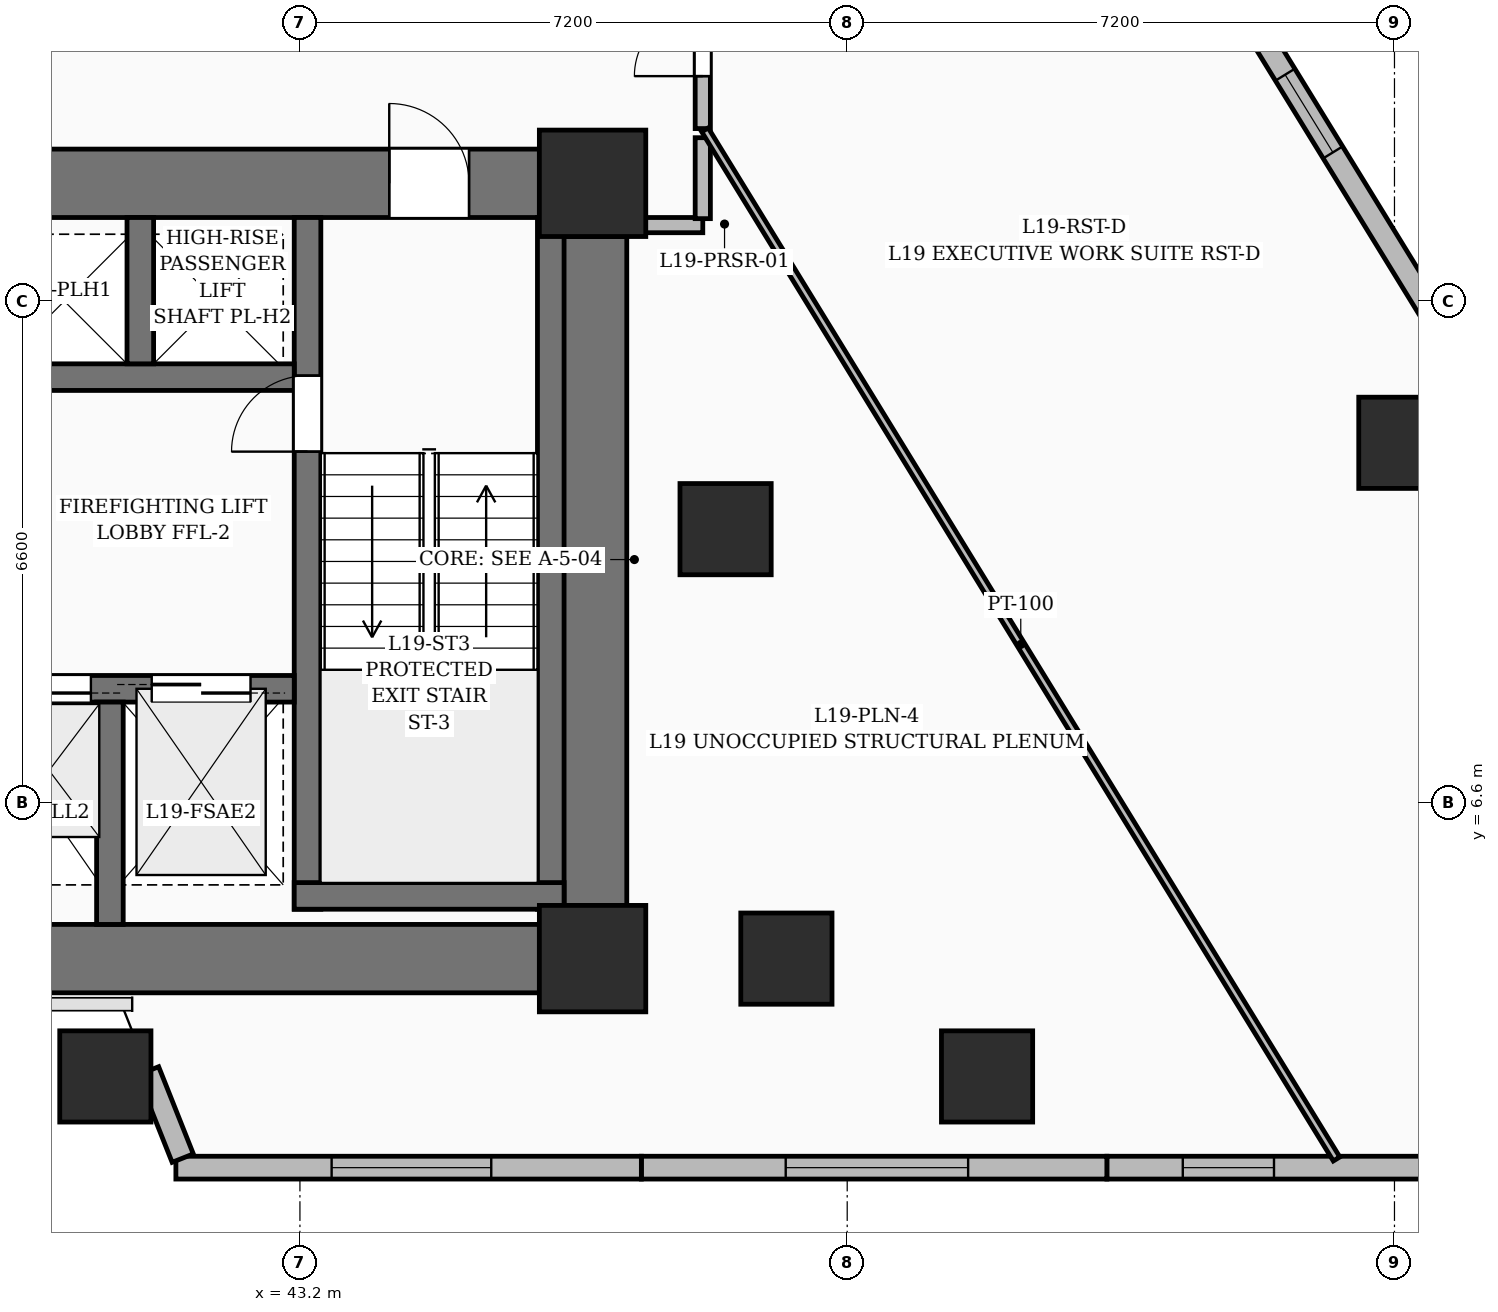
"""IFC4 building model, lengths in metres.
Left out: names, types, materials, properties, quantities, classifications, styles, units other than length and angle.
Written with IfcOpenShell. Run it as: python <this file> out.ifc"""

import sys

from ifc_helpers import new_model, si_unit, direction, frame, frame_2d, origin, origin_2d, place, context, subcontext, project, spatial, rectangle, extrude, element, fill, save


model = new_model("IFC4")
c1 = context("Model", 3, precision=1e-05, world=origin(), true_north=direction((0.0, 1.0)))
c2 = subcontext(c1, "Body", "Model", "MODEL_VIEW")
j1 = project(units=[si_unit("LENGTHUNIT", "METRE"), si_unit("PLANEANGLEUNIT", "RADIAN")], contexts=[c1])
p1 = place(None, origin())
s1 = spatial("IfcSite", under=j1, at=p1, CompositionType="ELEMENT")
p2 = place(p1, origin())
s2 = spatial("IfcBuilding", under=s1, at=p2, CompositionType="ELEMENT")
p3 = place(p2, frame((0.0, 0.0, 78.6)))
s3 = spatial("IfcBuildingStorey", under=s2, at=p3, CompositionType="ELEMENT", Elevation=78.6)
for number, where, z_axis, x_axis in (
    (1, (47.05, 4.55, 0.0), (0.0, 0.0, 1.0), (1.0, 0.0, 0.0)),
    (2, (47.05, 14.75, 0.0), (0.0, 0.0, 1.0), (1.0, 0.0, 0.0)),
):
    element("IfcColumn", number, at=place(p3, frame(where, z_axis=z_axis, x_axis=x_axis)), inside=s3, PredefinedType="COLUMN", context=c2, shape_type="SweptSolid", body=[
        extrude(rectangle(XDim=1.4, YDim=1.4, at=origin_2d()), origin(), (0.0, 0.0, 1.0), 3.6),
    ])
for number, where, z_axis, x_axis in (
    (3, (49.6, 4.55, 0.0), (0.0, 0.0, 1.0), (1.0, 0.0, 0.0)),
    (4, (48.8, 10.2, 0.0), (0.0, 0.0, 1.0), (1.0, 0.0, 0.0)),
):
    element("IfcColumn", number, at=place(p3, frame(where, z_axis=z_axis, x_axis=x_axis)), inside=s3, PredefinedType="COLUMN", context=c2, shape_type="SweptSolid", body=[
        extrude(rectangle(XDim=1.2, YDim=1.2, at=origin_2d()), origin(), (0.0, 0.0, 1.0), 3.6),
    ])
p4 = place(p3, frame((35.85, 4.55, 0.0), z_axis=(0.0, 0.0, 1.0), x_axis=(1.0, 0.0, 0.0)))
e5 = element("IfcWall", 5, at=p4, inside=s3, PredefinedType="SHEAR", context=c2, shape_type="SweptSolid", body=[
    extrude(rectangle(XDim=10.5, YDim=0.9, at=frame_2d((5.25, 0.0))), origin(), (0.0, 0.0, 1.0), 3.6),
])
p5 = place(p3, frame((35.85, 14.75, 0.0), z_axis=(0.0, 0.0, 1.0), x_axis=(1.0, 0.0, 0.0)))
e6 = element("IfcWall", 6, at=p5, inside=s3, PredefinedType="SHEAR", context=c2, shape_type="SweptSolid", body=[
    extrude(rectangle(XDim=10.5, YDim=0.9, at=frame_2d((5.25, 0.0))), origin(), (0.0, 0.0, 1.0), 3.6),
])
p6 = place(p5, frame((0.925, 0.0, 0.0)))
e7 = element("IfcOpeningElement", 7, at=p6, cuts=e6, PredefinedType="OPENING", context=c2, shape_type="SweptSolid", body=[
    extrude(rectangle(XDim=1.05, YDim=2.15, at=frame_2d((0.525, 1.075))), frame((0.0, 0.46, 0.0), z_axis=(0.0, -1.0, 0.0), x_axis=(1.0, 0.0, 0.0)), (0.0, 0.0, 1.0), 0.92),
])
p7 = place(p5, frame((8.525, 0.0, 0.0)))
e8 = element("IfcOpeningElement", 8, at=p7, cuts=e6, PredefinedType="OPENING", context=c2, shape_type="SweptSolid", body=[
    extrude(rectangle(XDim=1.05, YDim=2.15, at=frame_2d((0.525, 1.075))), frame((0.0, 0.46, 0.0), z_axis=(0.0, -1.0, 0.0), x_axis=(1.0, 0.0, 0.0)), (0.0, 0.0, 1.0), 0.92),
])
p8 = place(p3, frame((47.05, 5.25, 0.0), z_axis=(0.0, 0.0, 1.0), x_axis=(0.0, 1.0, 0.0)))
e9 = element("IfcWall", 9, at=p8, inside=s3, PredefinedType="SHEAR", context=c2, shape_type="SweptSolid", body=[
    extrude(rectangle(XDim=8.8, YDim=0.9, at=frame_2d((4.4, 0.0))), origin(), (0.0, 0.0, 1.0), 3.6),
])
p9 = place(p3, frame((43.3, 5.2, 0.0), z_axis=(0.0, 0.0, 1.0), x_axis=(0.0, 1.0, 0.0)))
e10 = element("IfcWall", 10, at=p9, inside=s3, PredefinedType="SOLIDWALL", context=c2, shape_type="SweptSolid", body=[
    extrude(rectangle(XDim=9.1, YDim=0.35, at=frame_2d((4.55, 0.0))), origin(), (0.0, 0.0, 1.0), 3.6),
])
p10 = place(p9, frame((6.02, 0.0, 0.0)))
e11 = element("IfcOpeningElement", 11, at=p10, cuts=e10, PredefinedType="OPENING", context=c2, shape_type="SweptSolid", body=[
    extrude(rectangle(XDim=1.0, YDim=2.15, at=frame_2d((0.5, 1.075))), frame((0.0, 0.185, 0.0), z_axis=(0.0, -1.0, 0.0), x_axis=(1.0, 0.0, 0.0)), (0.0, 0.0, 1.0), 0.37),
])
p11 = place(p3, frame((46.5, 5.2, 0.0), z_axis=(0.0, 0.0, 1.0), x_axis=(0.0, 1.0, 0.0)))
e12 = element("IfcWall", 12, at=p11, inside=s3, PredefinedType="SOLIDWALL", context=c2, shape_type="SweptSolid", body=[
    extrude(rectangle(XDim=9.1, YDim=0.35, at=frame_2d((4.55, 0.0))), origin(), (0.0, 0.0, 1.0), 3.6),
])
p12 = place(p3, frame((43.125, 5.375, 0.0), z_axis=(0.0, 0.0, 1.0), x_axis=(1.0, 0.0, 0.0)))
e13 = element("IfcWall", 13, at=p12, inside=s3, PredefinedType="SOLIDWALL", context=c2, shape_type="SweptSolid", body=[
    extrude(rectangle(XDim=3.55, YDim=0.35, at=frame_2d((1.775, 0.0))), origin(), (0.0, 0.0, 1.0), 3.6),
])
p13 = place(p3, frame((39.075, 8.1, 0.0), z_axis=(0.0, 0.0, 1.0), x_axis=(1.0, 0.0, 0.0)))
e14 = element("IfcWall", 14, at=p13, inside=s3, PredefinedType="SOLIDWALL", context=c2, shape_type="SweptSolid", body=[
    extrude(rectangle(XDim=4.05, YDim=0.35, at=frame_2d((2.025, 0.0))), origin(), (0.0, 0.0, 1.0), 3.6),
])
p14 = place(p13, frame((2.175, 0.0, 0.0)))
e15 = element("IfcOpeningElement", 15, at=p14, cuts=e14, PredefinedType="OPENING", context=c2, shape_type="SweptSolid", body=[
    extrude(rectangle(XDim=1.3, YDim=2.25, at=frame_2d((0.65, 1.125))), frame((0.0, 0.185, 0.0), z_axis=(0.0, -1.0, 0.0), x_axis=(1.0, 0.0, 0.0)), (0.0, 0.0, 1.0), 0.37),
])
p15 = place(p13, frame((0.275, 0.0, 0.0)))
e16 = element("IfcOpeningElement", 16, at=p15, cuts=e14, PredefinedType="OPENING", context=c2, shape_type="SweptSolid", body=[
    extrude(rectangle(XDim=1.1, YDim=2.2, at=frame_2d((0.55, 1.1))), frame((0.0, 0.185, 0.0), z_axis=(0.0, -1.0, 0.0), x_axis=(1.0, 0.0, 0.0)), (0.0, 0.0, 1.0), 0.37),
])
p16 = place(p3, frame((40.7, 5.0, 0.0), z_axis=(0.0, 0.0, 1.0), x_axis=(0.0, 1.0, 0.0)))
e17 = element("IfcWall", 17, at=p16, inside=s3, PredefinedType="SOLIDWALL", context=c2, shape_type="SweptSolid", body=[
    extrude(rectangle(XDim=2.925, YDim=0.35, at=frame_2d((1.462, 0.0))), origin(), (0.0, 0.0, 1.0), 3.6),
])
p17 = place(p3, frame((39.075, 12.2, 0.0), z_axis=(0.0, 0.0, 1.0), x_axis=(1.0, 0.0, 0.0)))
e18 = element("IfcWall", 18, at=p17, inside=s3, PredefinedType="SOLIDWALL", context=c2, shape_type="SweptSolid", body=[
    extrude(rectangle(XDim=4.05, YDim=0.35, at=frame_2d((2.025, 0.0))), origin(), (0.0, 0.0, 1.0), 3.6),
])
p18 = place(p3, frame((41.1, 12.375, 0.0), z_axis=(0.0, 0.0, 1.0), x_axis=(0.0, 1.0, 0.0)))
e19 = element("IfcWall", 19, at=p18, inside=s3, PredefinedType="SOLIDWALL", context=c2, shape_type="SweptSolid", body=[
    extrude(rectangle(XDim=1.925, YDim=0.35, at=frame_2d((0.962, 0.0))), origin(), (0.0, 0.0, 1.0), 3.6),
])
for number, where, z_axis, x_axis in (
    (20, (40.64, 3.0, 0.0), (0.0, 0.0, 1.0), (1.0, 0.0, 0.0)),
    (21, (52.24, 3.0, 0.0), (0.0, 0.0, 1.0), (1.0, 0.0, 0.0)),
    (22, (57.73, 11.336, 0.0), (0.0, 0.0, 1.0), (1.0, 0.0, 0.0)),
):
    element("IfcColumn", number, at=place(p3, frame(where, z_axis=z_axis, x_axis=x_axis)), inside=s3, PredefinedType="COLUMN", context=c2, shape_type="SweptSolid", body=[
        extrude(rectangle(XDim=1.2, YDim=1.2, at=origin_2d()), origin(), (0.0, 0.0, 1.0), 3.6),
    ])
p19 = place(p3, frame((54.041, 19.629, 0.0), z_axis=(0.0, 0.0, 1.0), x_axis=(0.523661280051, -0.851926560083, 0.0)))
e23 = element("IfcWall", 23, at=p19, inside=s3, PredefinedType="SOLIDWALL", context=c2, shape_type="SweptSolid", body=[
    extrude(rectangle(XDim=7.934, YDim=0.3, at=frame_2d((3.967, 0.0))), origin(), (0.0, 0.0, 1.0), 3.35),
])
p20 = place(p19, frame((4.05, 0.0, 0.8)))
e24 = element("IfcOpeningElement", 24, at=p20, cuts=e23, PredefinedType="OPENING", context=c2, shape_type="SweptSolid", body=[
    extrude(rectangle(XDim=1.2, YDim=1.8, at=frame_2d((0.6, 0.9))), frame((0.0, 0.16, 0.0), z_axis=(0.0, -1.0, 0.0), x_axis=(1.0, 0.0, 0.0)), (0.0, 0.0, 1.0), 0.32),
])
p21 = place(p3, frame((59.34, 1.8, 0.0), z_axis=(0.0, 0.0, 1.0), x_axis=(-1.0, 0.0, 0.0)))
e25 = element("IfcWall", 25, at=p21, inside=s3, PredefinedType="SOLIDWALL", context=c2, shape_type="SweptSolid", body=[
    extrude(rectangle(XDim=5.524, YDim=0.3, at=frame_2d((2.762, 0.0))), origin(), (0.0, 0.0, 1.0), 3.35),
])
p22 = place(p21, frame((3.325, 0.0, 0.8)))
e26 = element("IfcOpeningElement", 26, at=p22, cuts=e25, PredefinedType="OPENING", context=c2, shape_type="SweptSolid", body=[
    extrude(rectangle(XDim=1.2, YDim=1.8, at=frame_2d((0.6, 0.9))), frame((0.0, 0.16, 0.0), z_axis=(0.0, -1.0, 0.0), x_axis=(1.0, 0.0, 0.0)), (0.0, 0.0, 1.0), 0.32),
])
p23 = place(p3, frame((53.816, 1.8, 0.0), z_axis=(0.0, 0.0, 1.0), x_axis=(-1.0, 0.0, 0.0)))
e27 = element("IfcWall", 27, at=p23, inside=s3, PredefinedType="SOLIDWALL", context=c2, shape_type="SweptSolid", body=[
    extrude(rectangle(XDim=6.124, YDim=0.3, at=frame_2d((3.062, 0.0))), origin(), (0.0, 0.0, 1.0), 3.35),
])
p24 = place(p23, frame((1.825, 0.0, 0.6)))
e28 = element("IfcOpeningElement", 28, at=p24, cuts=e27, PredefinedType="OPENING", context=c2, shape_type="SweptSolid", body=[
    extrude(rectangle(XDim=2.4, YDim=2.1, at=frame_2d((1.2, 1.05))), frame((0.0, 0.16, 0.0), z_axis=(0.0, -1.0, 0.0), x_axis=(1.0, 0.0, 0.0)), (0.0, 0.0, 1.0), 0.32),
])
p25 = place(p3, frame((47.692, 1.8, 0.0), z_axis=(0.0, 0.0, 1.0), x_axis=(-1.0, 0.0, 0.0)))
e29 = element("IfcWall", 29, at=p25, inside=s3, PredefinedType="SOLIDWALL", context=c2, shape_type="SweptSolid", body=[
    extrude(rectangle(XDim=6.124, YDim=0.3, at=frame_2d((3.062, 0.0))), origin(), (0.0, 0.0, 1.0), 3.35),
])
p26 = place(p25, frame((1.975, 0.0, 0.55)))
e30 = element("IfcOpeningElement", 30, at=p26, cuts=e29, PredefinedType="OPENING", context=c2, shape_type="SweptSolid", body=[
    extrude(rectangle(XDim=2.1, YDim=2.4, at=frame_2d((1.05, 1.2))), frame((0.0, 0.16, 0.0), z_axis=(0.0, -1.0, 0.0), x_axis=(1.0, 0.0, 0.0)), (0.0, 0.0, 1.0), 0.32),
])
p27 = place(p3, frame((41.658, 1.925, 0.0), z_axis=(0.0, 0.0, 1.0), x_axis=(-0.369583004586, 0.929197719929, 0.0)))
e31 = element("IfcWall", 31, at=p27, inside=s3, PredefinedType="SOLIDWALL", context=c2, shape_type="SweptSolid", body=[
    extrude(rectangle(XDim=1.235, YDim=0.3, at=frame_2d((0.617, 0.0))), origin(), (0.0, 0.0, 1.0), 2.375),
])
p28 = place(p3, frame((47.5, 14.2, 0.0), z_axis=(0.0, 0.0, 1.0), x_axis=(1.0, 0.0, 0.0)))
e32 = element("IfcWall", 32, at=p28, inside=s3, PredefinedType="PARTITIONING", context=c2, shape_type="SweptSolid", body=[
    extrude(rectangle(XDim=1.0, YDim=0.2, at=frame_2d((0.5, 0.0))), origin(), (0.0, 0.0, 1.0), 3.35),
])
p29 = place(p3, frame((48.5, 14.285, 0.0), z_axis=(0.0, 0.0, 1.0), x_axis=(0.0, 1.0, 0.0)))
e33 = element("IfcWall", 33, at=p29, inside=s3, PredefinedType="PARTITIONING", context=c2, shape_type="SweptSolid", body=[
    extrude(rectangle(XDim=1.065, YDim=0.2, at=frame_2d((0.533, 0.0))), origin(), (0.0, 0.0, 1.0), 3.35),
])
p30 = place(p3, frame((48.5, 15.47, 0.0), z_axis=(0.0, 0.0, 1.0), x_axis=(0.0, 1.0, 0.0)))
e34 = element("IfcWall", 34, at=p30, inside=s3, PredefinedType="PARTITIONING", context=c2, shape_type="SweptSolid", body=[
    extrude(rectangle(XDim=2.28, YDim=0.2, at=frame_2d((1.14, 0.0))), origin(), (0.0, 0.0, 1.0), 2.345),
])
p31 = place(p30, frame((0.69, 0.0, 0.0)))
e35 = element("IfcOpeningElement", 35, at=p31, cuts=e34, PredefinedType="OPENING", context=c2, shape_type="SweptSolid", body=[
    extrude(rectangle(XDim=0.9, YDim=2.1, at=frame_2d((0.45, 1.05))), frame((0.0, 0.11, 0.0), z_axis=(0.0, -1.0, 0.0), x_axis=(1.0, 0.0, 0.0)), (0.0, 0.0, 1.0), 0.22),
])
p32 = place(p3, frame((48.529, 15.453, 0.0), z_axis=(0.0, 0.0, 1.0), x_axis=(0.52306290803, -0.852294077325, 0.0)))
e36 = element("IfcWall", 36, at=p32, inside=s3, PredefinedType="PARTITIONING", context=c2, shape_type="SweptSolid", body=[
    extrude(rectangle(XDim=15.885, YDim=0.1, at=frame_2d((7.943, 0.0))), origin(), (0.0, 0.0, 1.0), 2.345),
])
p33 = place(p20, origin())
e37 = element("IfcWindow", 37, at=p33, inside=s3, PartitioningType="SINGLE_PANEL", PredefinedType="WINDOW", context=c2, shape_type="SweptSolid", body=[
    extrude(rectangle(XDim=1.2, YDim=1.8, at=frame_2d((0.6, 0.9))), frame((0.0, 0.03, 0.0), z_axis=(0.0, -1.0, 0.0), x_axis=(1.0, 0.0, 0.0)), (0.0, 0.0, 1.0), 0.06),
])
fill(e24, e37)
p34 = place(p22, origin())
e38 = element("IfcWindow", 38, at=p34, inside=s3, PartitioningType="SINGLE_PANEL", PredefinedType="WINDOW", context=c2, shape_type="SweptSolid", body=[
    extrude(rectangle(XDim=1.2, YDim=1.8, at=frame_2d((0.6, 0.9))), frame((0.0, 0.03, 0.0), z_axis=(0.0, -1.0, 0.0), x_axis=(1.0, 0.0, 0.0)), (0.0, 0.0, 1.0), 0.06),
])
fill(e26, e38)
p35 = place(p24, origin())
e39 = element("IfcWindow", 39, at=p35, inside=s3, PartitioningType="SINGLE_PANEL", PredefinedType="WINDOW", context=c2, shape_type="SweptSolid", body=[
    extrude(rectangle(XDim=2.4, YDim=2.1, at=frame_2d((1.2, 1.05))), frame((0.0, 0.03, 0.0), z_axis=(0.0, -1.0, 0.0), x_axis=(1.0, 0.0, 0.0)), (0.0, 0.0, 1.0), 0.06),
])
fill(e28, e39)
p36 = place(p26, origin())
e40 = element("IfcWindow", 40, at=p36, inside=s3, PartitioningType="SINGLE_PANEL", PredefinedType="WINDOW", context=c2, shape_type="SweptSolid", body=[
    extrude(rectangle(XDim=2.1, YDim=2.4, at=frame_2d((1.05, 1.2))), frame((0.0, 0.03, 0.0), z_axis=(0.0, -1.0, 0.0), x_axis=(1.0, 0.0, 0.0)), (0.0, 0.0, 1.0), 0.06),
])
fill(e30, e40)
p37 = place(p7, origin())
e41 = element("IfcDoor", 41, at=p37, inside=s3, OperationType="SINGLE_SWING_LEFT", PredefinedType="DOOR", context=c2, shape_type="SweptSolid", body=[
    extrude(rectangle(XDim=1.05, YDim=2.15, at=frame_2d((0.525, 1.075))), frame((0.0, 0.025, 0.0), z_axis=(0.0, -1.0, 0.0), x_axis=(1.0, 0.0, 0.0)), (0.0, 0.0, 1.0), 0.05),
])
fill(e8, e41)
p38 = place(p10, origin())
e42 = element("IfcDoor", 42, at=p38, inside=s3, OperationType="SINGLE_SWING_LEFT", PredefinedType="DOOR", context=c2, shape_type="SweptSolid", body=[
    extrude(rectangle(XDim=1.0, YDim=2.15, at=frame_2d((0.5, 1.075))), frame((0.0, 0.025, 0.0), z_axis=(0.0, -1.0, 0.0), x_axis=(1.0, 0.0, 0.0)), (0.0, 0.0, 1.0), 0.05),
])
fill(e11, e42)
p39 = place(p14, origin())
e43 = element("IfcDoor", 43, at=p39, inside=s3, OperationType="DOUBLE_DOOR_SLIDING", PredefinedType="DOOR", context=c2, shape_type="SweptSolid", body=[
    extrude(rectangle(XDim=1.3, YDim=2.25, at=frame_2d((0.65, 1.125))), frame((0.0, 0.025, 0.0), z_axis=(0.0, -1.0, 0.0), x_axis=(1.0, 0.0, 0.0)), (0.0, 0.0, 1.0), 0.05),
])
fill(e15, e43)
p40 = place(p15, origin())
e44 = element("IfcDoor", 44, at=p40, inside=s3, OperationType="DOUBLE_DOOR_SLIDING", PredefinedType="DOOR", context=c2, shape_type="SweptSolid", body=[
    extrude(rectangle(XDim=1.1, YDim=2.2, at=frame_2d((0.55, 1.1))), frame((0.0, 0.025, 0.0), z_axis=(0.0, -1.0, 0.0), x_axis=(1.0, 0.0, 0.0)), (0.0, 0.0, 1.0), 0.05),
])
fill(e16, e44)
p41 = place(p31, origin())
e45 = element("IfcDoor", 45, at=p41, inside=s3, OperationType="SINGLE_SWING_LEFT", PredefinedType="DOOR", context=c2, shape_type="SweptSolid", body=[
    extrude(rectangle(XDim=0.9, YDim=2.1, at=frame_2d((0.45, 1.05))), frame((0.0, 0.025, 0.0), z_axis=(0.0, -1.0, 0.0), x_axis=(1.0, 0.0, 0.0)), (0.0, 0.0, 1.0), 0.05),
])
fill(e35, e45)
save(model, sys.argv[1])
